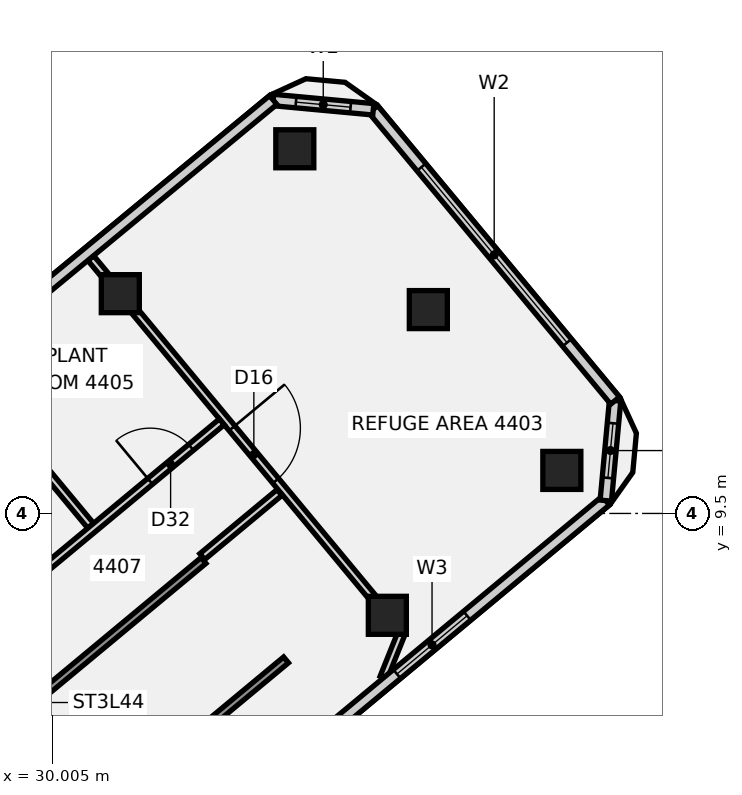
"""IFC4 building model, lengths in metres.
Left out: names, types, materials, properties, quantities, classifications, styles, units other than length and angle.
Written with IfcOpenShell. Run it as: python <this file> out.ifc"""

import sys

from ifc_helpers import new_model, si_unit, direction, frame, frame_2d, origin, origin_2d, place, context, subcontext, project, spatial, polyline, rectangle, outline, extrude, element, fill, save


model = new_model("IFC4")
c1 = context("Model", 3, precision=1e-05, world=origin(), true_north=direction((0.0, 1.0)))
c2 = subcontext(c1, "Body", "Model", "MODEL_VIEW")
j1 = project(units=[si_unit("LENGTHUNIT", "METRE"), si_unit("PLANEANGLEUNIT", "RADIAN")], contexts=[c1])
p1 = place(None, origin())
s1 = spatial("IfcSite", under=j1, at=p1, CompositionType="ELEMENT")
p2 = place(p1, origin())
s2 = spatial("IfcBuilding", under=s1, at=p2, CompositionType="ELEMENT")
p3 = place(p2, frame((0.0, 0.0, 178.0)))
s3 = spatial("IfcBuildingStorey", under=s2, at=p3, CompositionType="ELEMENT", Elevation=178.0)
for number, where, z_axis, x_axis in (
    (1, (31.797, 15.283, -0.151), (0.0, 0.0, 1.0), (0.769, 0.639, 0.0)),
    (2, (38.823, 6.82, -0.151), (0.0, 0.0, 1.0), (0.769, 0.639, 0.0)),
):
    element("IfcColumn", number, at=place(p3, frame(where, z_axis=z_axis, x_axis=x_axis)), inside=s3, PredefinedType="COLUMN", context=c2, shape_type="SweptSolid", body=[
        extrude(rectangle(XDim=1.0, YDim=1.0, at=origin_2d()), origin(), (0.0, 0.0, 1.0), 4.401),
    ])
p4 = place(p3, frame((43.416, 10.632, -0.139), z_axis=(0.0, 0.0, 1.0), x_axis=(0.769372797728, 0.638800045488, 0.0)))
e3 = element("IfcColumn", 3, at=p4, inside=s3, PredefinedType="COLUMN", context=c2, shape_type="SweptSolid", body=[
    extrude(rectangle(XDim=1.0, YDim=1.0, at=origin_2d()), origin(), (0.0, 0.0, 1.0), 4.389),
])
p5 = place(p3, frame((39.902, 14.864, -0.132), z_axis=(0.0, 0.0, 1.0), x_axis=(0.769372797728, 0.638800045488, 0.0)))
e4 = element("IfcColumn", 4, at=p5, inside=s3, PredefinedType="COLUMN", context=c2, shape_type="SweptSolid", body=[
    extrude(rectangle(XDim=1.0, YDim=1.0, at=origin_2d()), origin(), (0.0, 0.0, 1.0), 4.382),
])
p6 = place(p3, frame((36.389, 19.095, -0.126), z_axis=(0.0, 0.0, 1.0), x_axis=(0.769372797728, 0.638800045488, 0.0)))
e5 = element("IfcColumn", 5, at=p6, inside=s3, PredefinedType="COLUMN", context=c2, shape_type="SweptSolid", body=[
    extrude(rectangle(XDim=1.0, YDim=1.0, at=origin_2d()), origin(), (0.0, 0.0, 1.0), 4.376),
])
p7 = place(p3, frame((27.549, 13.355, 0.0), z_axis=(0.0, 0.0, 1.0), x_axis=(0.638732777431, -0.769428644538, 0.0)))
e6 = element("IfcWall", 6, at=p7, inside=s3, PredefinedType="PARTITIONING", context=c2, shape_type="SweptSolid", body=[
    extrude(rectangle(XDim=5.43, YDim=0.2, at=frame_2d((2.715, 0.0))), origin(), (0.0, 0.0, 1.0), 3.65),
])
p8 = place(p3, frame((31.019, 16.219, 0.0), z_axis=(0.0, 0.0, 1.0), x_axis=(0.638955780134, -0.769243466682, 0.0)))
e7 = element("IfcWall", 7, at=p8, inside=s3, PredefinedType="PARTITIONING", context=c2, shape_type="SweptSolid", body=[
    extrude(rectangle(XDim=0.626, YDim=0.2, at=frame_2d((0.313, 0.0))), origin(), (0.0, 0.0, 1.0), 3.66),
])
p9 = place(p3, frame((32.175, 14.827, 0.0), z_axis=(0.0, 0.0, 1.0), x_axis=(0.638855099659, -0.769327083651, 0.0)))
e8 = element("IfcWall", 8, at=p9, inside=s3, PredefinedType="PARTITIONING", context=c2, shape_type="SweptSolid", body=[
    extrude(rectangle(XDim=9.816, YDim=0.2, at=frame_2d((4.908, 0.0))), origin(), (0.0, 0.0, 1.0), 3.55),
])
p10 = place(p9, frame((4.009, 0.0, 0.0)))
e9 = element("IfcOpeningElement", 9, at=p10, cuts=e8, PredefinedType="OPENING", context=c2, shape_type="SweptSolid", body=[
    extrude(rectangle(XDim=1.8, YDim=2.1, at=frame_2d((0.9, 1.05))), frame((0.0, 0.11, 0.0), z_axis=(0.0, -1.0, 0.0), x_axis=(1.0, 0.0, 0.0)), (0.0, 0.0, 1.0), 0.22),
])
p11 = place(p3, frame((39.202, 6.365, 0.0), z_axis=(0.0, 0.0, 1.0), x_axis=(-0.372742207649, -0.92793493664, 0.0)))
e10 = element("IfcWall", 10, at=p11, inside=s3, PredefinedType="PARTITIONING", context=c2, shape_type="SweptSolid", body=[
    extrude(rectangle(XDim=1.277, YDim=0.2, at=frame_2d((0.638, 0.0))), origin(), (0.0, 0.0, 1.0), 3.66),
])
p12 = place(p3, frame((24.249, 3.427, 0.0), z_axis=(0.0, 0.0, 1.0), x_axis=(0.769410395732, 0.638754759622, 0.0)))
e11 = element("IfcWall", 11, at=p12, inside=s3, PredefinedType="PARTITIONING", context=c2, shape_type="SweptSolid", body=[
    extrude(rectangle(XDim=13.28, YDim=0.2, at=frame_2d((6.64, 0.0))), origin(), (0.0, 0.0, 1.0), 3.55),
])
p13 = place(p12, frame((2.58, 0.0, 0.0)))
e12 = element("IfcOpeningElement", 12, at=p13, cuts=e11, PredefinedType="OPENING", context=c2, shape_type="SweptSolid", body=[
    extrude(rectangle(XDim=1.4, YDim=2.1, at=frame_2d((0.7, 1.05))), frame((0.0, 0.11, 0.0), z_axis=(0.0, -1.0, 0.0), x_axis=(1.0, 0.0, 0.0)), (0.0, 0.0, 1.0), 0.22),
])
p14 = place(p12, frame((10.83, 0.0, 0.0)))
e13 = element("IfcOpeningElement", 13, at=p14, cuts=e11, PredefinedType="OPENING", context=c2, shape_type="SweptSolid", body=[
    extrude(rectangle(XDim=1.4, YDim=2.1, at=frame_2d((0.7, 1.05))), frame((0.0, 0.11, 0.0), z_axis=(0.0, -1.0, 0.0), x_axis=(1.0, 0.0, 0.0)), (0.0, 0.0, 1.0), 0.22),
])
p15 = place(p3, frame((33.953, 8.365, 0.0), z_axis=(0.0, 0.0, 1.0), x_axis=(0.76940988431, 0.638755375653, 0.0)))
e14 = element("IfcWall", 14, at=p15, inside=s3, PredefinedType="PARTITIONING", context=c2, shape_type="SweptSolid", body=[
    extrude(rectangle(XDim=2.64, YDim=0.2, at=frame_2d((1.32, 0.0))), origin(), (0.0, 0.0, 1.0), 3.55),
])
p16 = place(p3, frame((27.113, -4.658, 0.0), z_axis=(0.0, 0.0, 1.0), x_axis=(0.769372572794, 0.6388003164, 0.0)))
e15 = element("IfcWall", 15, at=p16, inside=s3, PredefinedType="SOLIDWALL", context=c2, shape_type="SweptSolid", body=[
    extrude(rectangle(XDim=22.693, YDim=0.3, at=frame_2d((11.347, 0.0))), origin(), (0.0, 0.0, 1.0), 4.36),
])
p17 = place(p16, frame((4.093, 0.0, 1.4)))
e16 = element("IfcOpeningElement", 16, at=p17, cuts=e15, PredefinedType="OPENING", context=c2, shape_type="SweptSolid", body=[
    extrude(rectangle(XDim=2.199, YDim=2.6, at=frame_2d((1.1, 1.3))), frame((0.0, 0.16, 0.0), z_axis=(0.0, -1.0, 0.0), x_axis=(1.0, 0.0, 0.0)), (0.0, 0.0, 1.0), 0.32),
])
p18 = place(p16, frame((15.55, 0.0, 1.4)))
e17 = element("IfcOpeningElement", 17, at=p18, cuts=e15, PredefinedType="OPENING", context=c2, shape_type="SweptSolid", body=[
    extrude(rectangle(XDim=2.4, YDim=2.1, at=frame_2d((1.2, 1.05))), frame((0.0, 0.16, 0.0), z_axis=(0.0, -1.0, 0.0), x_axis=(1.0, 0.0, 0.0)), (0.0, 0.0, 1.0), 0.32),
])
p19 = place(p3, frame((44.572, 9.838, 0.0), z_axis=(0.0, 0.0, 1.0), x_axis=(0.092333837784, 0.995728106664, 0.0)))
e18 = element("IfcWall", 18, at=p19, inside=s3, PredefinedType="SOLIDWALL", context=c2, shape_type="SweptSolid", body=[
    extrude(rectangle(XDim=2.644, YDim=0.3, at=frame_2d((1.322, 0.0))), origin(), (0.0, 0.0, 1.0), 4.36),
])
p20 = place(p19, frame((0.6, 0.0, 1.4)))
e19 = element("IfcOpeningElement", 19, at=p20, cuts=e18, PredefinedType="OPENING", context=c2, shape_type="SweptSolid", body=[
    extrude(rectangle(XDim=1.444, YDim=2.6, at=frame_2d((0.722, 1.3))), frame((0.0, 0.16, 0.0), z_axis=(0.0, -1.0, 0.0), x_axis=(1.0, 0.0, 0.0)), (0.0, 0.0, 1.0), 0.32),
])
p21 = place(p3, frame((44.816, 12.471, 0.0), z_axis=(0.0, 0.0, 1.0), x_axis=(-0.638801916699, 0.769371244083, 0.0)))
e20 = element("IfcWall", 20, at=p21, inside=s3, PredefinedType="SOLIDWALL", context=c2, shape_type="SweptSolid", body=[
    extrude(rectangle(XDim=9.96, YDim=0.3, at=frame_2d((4.98, 0.0))), origin(), (0.0, 0.0, 1.0), 4.36),
])
p22 = place(p21, frame((1.98, 0.0, 1.4)))
e21 = element("IfcOpeningElement", 21, at=p22, cuts=e20, PredefinedType="OPENING", context=c2, shape_type="SweptSolid", body=[
    extrude(rectangle(XDim=6.0, YDim=2.6, at=frame_2d((3.0, 1.3))), frame((0.0, 0.16, 0.0), z_axis=(0.0, -1.0, 0.0), x_axis=(1.0, 0.0, 0.0)), (0.0, 0.0, 1.0), 0.32),
])
p23 = place(p3, frame((38.454, 20.134, 0.0), z_axis=(0.0, 0.0, 1.0), x_axis=(-0.995728893751, 0.092325349444, 0.0)))
e22 = element("IfcWall", 22, at=p23, inside=s3, PredefinedType="SOLIDWALL", context=c2, shape_type="SweptSolid", body=[
    extrude(rectangle(XDim=2.644, YDim=0.3, at=frame_2d((1.322, 0.0))), origin(), (0.0, 0.0, 1.0), 4.36),
])
p24 = place(p23, frame((0.6, 0.0, 1.4)))
e23 = element("IfcOpeningElement", 23, at=p24, cuts=e22, PredefinedType="OPENING", context=c2, shape_type="SweptSolid", body=[
    extrude(rectangle(XDim=1.444, YDim=2.6, at=frame_2d((0.722, 1.3))), frame((0.0, 0.16, 0.0), z_axis=(0.0, -1.0, 0.0), x_axis=(1.0, 0.0, 0.0)), (0.0, 0.0, 1.0), 0.32),
])
p25 = place(p3, frame((35.821, 20.378, 0.0), z_axis=(0.0, 0.0, 1.0), x_axis=(-0.771230735656, -0.63655569464, 0.0)))
e24 = element("IfcWall", 24, at=p25, inside=s3, PredefinedType="SOLIDWALL", context=c2, shape_type="SweptSolid", body=[
    extrude(rectangle(XDim=14.064, YDim=0.3, at=frame_2d((7.032, 0.0))), origin(), (0.0, 0.0, 1.0), 4.36),
])
p26 = place(p3, frame((28.832, 3.982, -0.18), z_axis=(0.0, 0.0, 1.0), x_axis=(0.769366970134, 0.638807064196, 0.0)))
e25 = element("IfcWall", 25, at=p26, inside=s3, PredefinedType="SHEAR", context=c2, shape_type="SweptSolid", body=[
    extrude(rectangle(XDim=6.7, YDim=0.2, at=frame_2d((3.35, 0.0))), origin(), (0.0, 0.0, 1.0), 3.73),
])
p27 = place(p26, frame((0.35, 0.0, 0.0)))
e26 = element("IfcOpeningElement", 26, at=p27, cuts=e25, PredefinedType="OPENING", context=c2, shape_type="SweptSolid", body=[
    extrude(rectangle(XDim=1.0, YDim=2.1, at=frame_2d((0.5, 1.05))), frame((0.0, 0.11, 0.0), z_axis=(0.0, -1.0, 0.0), x_axis=(1.0, 0.0, 0.0)), (0.0, 0.0, 1.0), 0.22),
])
p28 = place(p3, frame((31.003, 1.367, -0.18), z_axis=(0.0, 0.0, 1.0), x_axis=(0.76938487904, 0.638785494438, 0.0)))
e27 = element("IfcWall", 27, at=p28, inside=s3, PredefinedType="SHEAR", context=c2, shape_type="SweptSolid", body=[
    extrude(rectangle(XDim=6.7, YDim=0.2, at=frame_2d((3.35, 0.0))), origin(), (0.0, 0.0, 1.0), 3.73),
])
p29 = place(p3, frame((0.0, 0.0, -0.18)))
e28 = element("IfcWall", 28, at=p29, inside=s3, PredefinedType="SHEAR", context=c2, shape_type="SweptSolid", body=[
    extrude(outline(polyline([(35.94, 5.596), (36.094, 5.723), (34.05, 8.186), (33.896, 8.058), (35.94, 5.596)])), origin(), (0.0, 0.0, 1.0), 3.73),
])
p30 = place(p10, origin())
e29 = element("IfcDoor", 29, at=p30, inside=s3, OperationType="DOUBLE_DOOR_SINGLE_SWING", PredefinedType="DOOR", context=c2, shape_type="SweptSolid", body=[
    extrude(rectangle(XDim=1.8, YDim=2.1, at=frame_2d((0.9, 1.05))), frame((0.0, 0.025, 0.0), z_axis=(0.0, -1.0, 0.0), x_axis=(1.0, 0.0, 0.0)), (0.0, 0.0, 1.0), 0.05),
])
fill(e9, e29)
p31 = place(p14, origin())
e30 = element("IfcDoor", 30, at=p31, inside=s3, OperationType="DOUBLE_DOOR_SINGLE_SWING", PredefinedType="DOOR", context=c2, shape_type="SweptSolid", body=[
    extrude(rectangle(XDim=1.4, YDim=2.1, at=frame_2d((0.7, 1.05))), frame((0.0, 0.025, 0.0), z_axis=(0.0, -1.0, 0.0), x_axis=(1.0, 0.0, 0.0)), (0.0, 0.0, 1.0), 0.05),
])
fill(e13, e30)
p32 = place(p20, origin())
e31 = element("IfcWindow", 31, at=p32, inside=s3, PartitioningType="SINGLE_PANEL", PredefinedType="WINDOW", context=c2, shape_type="SweptSolid", body=[
    extrude(rectangle(XDim=1.444, YDim=2.6, at=frame_2d((0.722, 1.3))), frame((0.0, 0.03, 0.0), z_axis=(0.0, -1.0, 0.0), x_axis=(1.0, 0.0, 0.0)), (0.0, 0.0, 1.0), 0.06),
])
fill(e19, e31)
p33 = place(p18, origin())
e32 = element("IfcWindow", 32, at=p33, inside=s3, PartitioningType="SINGLE_PANEL", PredefinedType="WINDOW", context=c2, shape_type="SweptSolid", body=[
    extrude(rectangle(XDim=2.4, YDim=2.1, at=frame_2d((1.2, 1.05))), frame((0.0, 0.03, 0.0), z_axis=(0.0, -1.0, 0.0), x_axis=(1.0, 0.0, 0.0)), (0.0, 0.0, 1.0), 0.06),
])
fill(e17, e32)
p34 = place(p22, origin())
e33 = element("IfcWindow", 33, at=p34, inside=s3, PartitioningType="SINGLE_PANEL", PredefinedType="WINDOW", context=c2, shape_type="SweptSolid", body=[
    extrude(rectangle(XDim=6.0, YDim=2.6, at=frame_2d((3.0, 1.3))), frame((0.0, 0.03, 0.0), z_axis=(0.0, -1.0, 0.0), x_axis=(1.0, 0.0, 0.0)), (0.0, 0.0, 1.0), 0.06),
])
fill(e21, e33)
p35 = place(p24, origin())
e34 = element("IfcWindow", 34, at=p35, inside=s3, PartitioningType="SINGLE_PANEL", PredefinedType="WINDOW", context=c2, shape_type="SweptSolid", body=[
    extrude(rectangle(XDim=1.444, YDim=2.6, at=frame_2d((0.722, 1.3))), frame((0.0, 0.03, 0.0), z_axis=(0.0, -1.0, 0.0), x_axis=(1.0, 0.0, 0.0)), (0.0, 0.0, 1.0), 0.06),
])
fill(e23, e34)
save(model, sys.argv[1])
